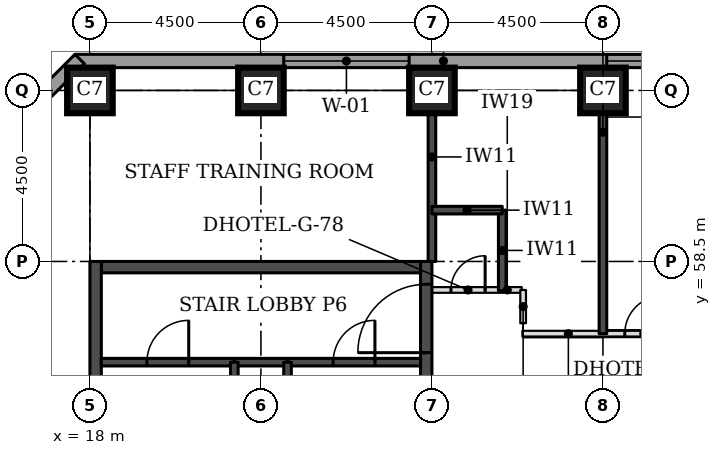
"""IFC4 building model, lengths in metres.
Left out: names, types, materials, properties, quantities, classifications, styles, units other than length and angle.
Written with IfcOpenShell. Run it as: python <this file> out.ifc"""

import sys

from ifc_helpers import new_model, si_unit, direction, frame, frame_2d, origin, origin_2d, place, context, subcontext, project, spatial, rectangle, extrude, element, fill, save


model = new_model("IFC4")
c1 = context("Model", 3, precision=1e-05, world=origin(), true_north=direction((0.0, 1.0)))
c2 = subcontext(c1, "Body", "Model", "MODEL_VIEW")
j1 = project(units=[si_unit("LENGTHUNIT", "METRE"), si_unit("PLANEANGLEUNIT", "RADIAN")], contexts=[c1])
p1 = place(None, origin())
s1 = spatial("IfcSite", under=j1, at=p1, CompositionType="ELEMENT")
p2 = place(p1, origin())
s2 = spatial("IfcBuilding", under=s1, at=p2, CompositionType="ELEMENT")
p3 = place(p2, frame((0.0, 0.0, 66.0)))
s3 = spatial("IfcBuildingStorey", under=s2, at=p3, CompositionType="ELEMENT", Elevation=66.0)
for number, where, z_axis, x_axis in (
    (1, (18.0, 63.0, 0.0), (0.0, 0.0, 1.0), (1.0, 0.0, 0.0)),
    (2, (22.5, 63.0, 0.0), (0.0, 0.0, 1.0), (1.0, 0.0, 0.0)),
    (3, (27.0, 63.0, 0.0), (0.0, 0.0, 1.0), (1.0, 0.0, 0.0)),
    (4, (31.5, 63.0, 0.0), (0.0, 0.0, 1.0), (1.0, 0.0, 0.0)),
):
    element("IfcColumn", number, at=place(p3, frame(where, z_axis=z_axis, x_axis=x_axis)), inside=s3, PredefinedType="COLUMN", context=c2, shape_type="SweptSolid", body=[
        extrude(rectangle(XDim=1.2, YDim=1.2, at=origin_2d()), origin(), (0.0, 0.0, 1.0), 3.3),
    ])
p4 = place(p3, frame((18.3, 58.35, 0.0), z_axis=(0.0, 0.0, 1.0), x_axis=(1.0, 0.0, 0.0)))
e5 = element("IfcWall", 5, at=p4, inside=s3, PredefinedType="SHEAR", context=c2, shape_type="SweptSolid", body=[
    extrude(rectangle(XDim=8.4, YDim=0.3, at=frame_2d((4.2, 0.0))), origin(), (0.0, 0.0, 1.0), 3.3),
])
p5 = place(p3, frame((18.15, 49.5, 0.0), z_axis=(0.0, 0.0, 1.0), x_axis=(0.0, 1.0, 0.0)))
e6 = element("IfcWall", 6, at=p5, inside=s3, PredefinedType="SHEAR", context=c2, shape_type="SweptSolid", body=[
    extrude(rectangle(XDim=9.0, YDim=0.3, at=frame_2d((4.5, 0.0))), origin(), (0.0, 0.0, 1.0), 3.3),
])
p6 = place(p3, frame((26.85, 49.5, 0.0), z_axis=(0.0, 0.0, 1.0), x_axis=(0.0, 1.0, 0.0)))
e7 = element("IfcWall", 7, at=p6, inside=s3, PredefinedType="SHEAR", context=c2, shape_type="SweptSolid", body=[
    extrude(rectangle(XDim=9.0, YDim=0.3, at=frame_2d((4.5, 0.0))), origin(), (0.0, 0.0, 1.0), 3.3),
])
p7 = place(p6, frame((6.6, 0.0, 0.0)))
e8 = element("IfcOpeningElement", 8, at=p7, cuts=e7, PredefinedType="OPENING", context=c2, shape_type="SweptSolid", body=[
    extrude(rectangle(XDim=1.8, YDim=2.1, at=frame_2d((0.9, 1.05))), frame((0.0, 0.16, 0.0), z_axis=(0.0, -1.0, 0.0), x_axis=(1.0, 0.0, 0.0)), (0.0, 0.0, 1.0), 0.32),
])
p8 = place(p3, frame((35.4, 63.775, 0.0), z_axis=(0.0, 0.0, 1.0), x_axis=(-1.0, 0.0, 0.0)))
e9 = element("IfcWall", 9, at=p8, inside=s3, PredefinedType="STANDARD", context=c2, shape_type="SweptSolid", body=[
    extrude(rectangle(XDim=17.793, YDim=0.35, at=frame_2d((8.897, 0.0))), origin(), (0.0, 0.0, 1.0), 3.055),
])
p9 = place(p8, frame((0.5, 0.0, 0.8)))
e10 = element("IfcOpeningElement", 10, at=p9, cuts=e9, PredefinedType="OPENING", context=c2, shape_type="SweptSolid", body=[
    extrude(rectangle(XDim=3.3, YDim=1.5, at=frame_2d((1.65, 0.75))), frame((0.0, 0.185, 0.0), z_axis=(0.0, -1.0, 0.0), x_axis=(1.0, 0.0, 0.0)), (0.0, 0.0, 1.0), 0.37),
])
p10 = place(p8, frame((9.0, 0.0, 0.8)))
e11 = element("IfcOpeningElement", 11, at=p10, cuts=e9, PredefinedType="OPENING", context=c2, shape_type="SweptSolid", body=[
    extrude(rectangle(XDim=3.3, YDim=1.5, at=frame_2d((1.65, 0.75))), frame((0.0, 0.185, 0.0), z_axis=(0.0, -1.0, 0.0), x_axis=(1.0, 0.0, 0.0)), (0.0, 0.0, 1.0), 0.37),
])
p11 = place(p3, frame((17.73, 63.826, 0.0), z_axis=(0.0, 0.0, 1.0), x_axis=(-0.707106781187, -0.707106781187, 0.0)))
e12 = element("IfcWall", 12, at=p11, inside=s3, PredefinedType="STANDARD", context=c2, shape_type="SweptSolid", body=[
    extrude(rectangle(XDim=7.151, YDim=0.35, at=frame_2d((3.576, 0.0))), origin(), (0.0, 0.0, 1.0), 3.055),
])
p12 = place(p11, frame((1.926, 0.0, 0.8)))
e13 = element("IfcOpeningElement", 13, at=p12, cuts=e12, PredefinedType="OPENING", context=c2, shape_type="SweptSolid", body=[
    extrude(rectangle(XDim=3.3, YDim=1.5, at=frame_2d((1.65, 0.75))), frame((0.0, 0.185, 0.0), z_axis=(0.0, -1.0, 0.0), x_axis=(1.0, 0.0, 0.0)), (0.0, 0.0, 1.0), 0.37),
])
p13 = place(p3, frame((29.38, 56.6, 0.0), z_axis=(0.0, 0.0, 1.0), x_axis=(1.0, 0.0, 0.0)))
e14 = element("IfcWall", 14, at=p13, inside=s3, PredefinedType="PARTITIONING", context=c2, shape_type="SweptSolid", body=[
    extrude(rectangle(XDim=13.62, YDim=0.15, at=frame_2d((6.81, 0.0))), origin(), (0.0, 0.0, 1.0), 3.08),
])
p14 = place(p13, frame((2.695, 0.0, 0.0)))
e15 = element("IfcOpeningElement", 15, at=p14, cuts=e14, PredefinedType="OPENING", context=c2, shape_type="SweptSolid", body=[
    extrude(rectangle(XDim=1.0, YDim=2.1, at=frame_2d((0.5, 1.05))), frame((0.0, 0.085, 0.0), z_axis=(0.0, -1.0, 0.0), x_axis=(1.0, 0.0, 0.0)), (0.0, 0.0, 1.0), 0.17),
])
p15 = place(p13, frame((9.67, 0.0, 0.0)))
e16 = element("IfcOpeningElement", 16, at=p15, cuts=e14, PredefinedType="OPENING", context=c2, shape_type="SweptSolid", body=[
    extrude(rectangle(XDim=0.9, YDim=2.1, at=frame_2d((0.45, 1.05))), frame((0.0, 0.085, 0.0), z_axis=(0.0, -1.0, 0.0), x_axis=(1.0, 0.0, 0.0)), (0.0, 0.0, 1.0), 0.17),
])
p16 = place(p3, frame((27.0, 58.5, 0.0), z_axis=(0.0, 0.0, 1.0), x_axis=(0.0, 1.0, 0.0)))
e17 = element("IfcWall", 17, at=p16, inside=s3, PredefinedType="SOLIDWALL", context=c2, shape_type="SweptSolid", body=[
    extrude(rectangle(XDim=3.9, YDim=0.2, at=frame_2d((1.95, 0.0))), origin(), (0.0, 0.0, 1.0), 3.08),
])
p17 = place(p3, frame((28.85, 57.73, 0.0), z_axis=(0.0, 0.0, 1.0), x_axis=(0.0, 1.0, 0.0)))
e18 = element("IfcWall", 18, at=p17, inside=s3, PredefinedType="SOLIDWALL", context=c2, shape_type="SweptSolid", body=[
    extrude(rectangle(XDim=2.12, YDim=0.2, at=frame_2d((1.06, 0.0))), origin(), (0.0, 0.0, 1.0), 3.08),
])
p18 = place(p3, frame((31.5, 56.6, 0.0), z_axis=(0.0, 0.0, 1.0), x_axis=(0.0, 1.0, 0.0)))
e19 = element("IfcWall", 19, at=p18, inside=s3, PredefinedType="SOLIDWALL", context=c2, shape_type="SweptSolid", body=[
    extrude(rectangle(XDim=5.8, YDim=0.2, at=frame_2d((2.9, 0.0))), origin(), (0.0, 0.0, 1.0), 3.08),
])
p19 = place(p3, frame((27.0, 59.85, 0.0), z_axis=(0.0, 0.0, 1.0), x_axis=(1.0, 0.0, 0.0)))
e20 = element("IfcWall", 20, at=p19, inside=s3, PredefinedType="SOLIDWALL", context=c2, shape_type="SweptSolid", body=[
    extrude(rectangle(XDim=1.85, YDim=0.2, at=frame_2d((0.925, 0.0))), origin(), (0.0, 0.0, 1.0), 3.08),
])
p20 = place(p3, frame((27.0, 57.75, 0.0), z_axis=(0.0, 0.0, 1.0), x_axis=(1.0, 0.0, 0.0)))
e21 = element("IfcWall", 21, at=p20, inside=s3, PredefinedType="PARTITIONING", context=c2, shape_type="SweptSolid", body=[
    extrude(rectangle(XDim=2.365, YDim=0.15, at=frame_2d((1.183, 0.0))), origin(), (0.0, 0.0, 1.0), 3.08),
])
p21 = place(p20, frame((0.5, 0.0, 0.0)))
e22 = element("IfcOpeningElement", 22, at=p21, cuts=e21, PredefinedType="OPENING", context=c2, shape_type="SweptSolid", body=[
    extrude(rectangle(XDim=0.9, YDim=2.1, at=frame_2d((0.45, 1.05))), frame((0.0, 0.085, 0.0), z_axis=(0.0, -1.0, 0.0), x_axis=(1.0, 0.0, 0.0)), (0.0, 0.0, 1.0), 0.17),
])
p22 = place(p3, frame((29.4, 57.75, 0.0), z_axis=(0.0, 0.0, 1.0), x_axis=(0.0, -1.0, 0.0)))
e23 = element("IfcWall", 23, at=p22, inside=s3, PredefinedType="PARTITIONING", context=c2, shape_type="SweptSolid", body=[
    extrude(rectangle(XDim=0.875, YDim=0.15, at=frame_2d((0.438, 0.0))), origin(), (0.0, 0.0, 1.0), 3.08),
])
p23 = place(p3, frame((21.8, 55.85, 0.0), z_axis=(0.0, 0.0, 1.0), x_axis=(1.0, 0.0, 0.0)))
e24 = element("IfcWall", 24, at=p23, inside=s3, PredefinedType="SOLIDWALL", context=c2, shape_type="SweptSolid", body=[
    extrude(rectangle(XDim=1.4, YDim=0.2, at=frame_2d((0.7, 0.0))), origin(), (0.0, 0.0, 1.0), 3.08),
])
p24 = place(p3, frame((18.3, 55.85, 0.0), z_axis=(0.0, 0.0, 1.0), x_axis=(1.0, 0.0, 0.0)))
e25 = element("IfcWall", 25, at=p24, inside=s3, PredefinedType="SOLIDWALL", context=c2, shape_type="SweptSolid", body=[
    extrude(rectangle(XDim=3.5, YDim=0.2, at=frame_2d((1.75, 0.0))), origin(), (0.0, 0.0, 1.0), 3.08),
])
p25 = place(p24, frame((1.2, 0.0, 0.0)))
e26 = element("IfcOpeningElement", 26, at=p25, cuts=e25, PredefinedType="OPENING", context=c2, shape_type="SweptSolid", body=[
    extrude(rectangle(XDim=1.1, YDim=2.1, at=frame_2d((0.55, 1.05))), frame((0.0, 0.11, 0.0), z_axis=(0.0, -1.0, 0.0), x_axis=(1.0, 0.0, 0.0)), (0.0, 0.0, 1.0), 0.22),
])
p26 = place(p3, frame((23.2, 55.85, 0.0), z_axis=(0.0, 0.0, 1.0), x_axis=(1.0, 0.0, 0.0)))
e27 = element("IfcWall", 27, at=p26, inside=s3, PredefinedType="SOLIDWALL", context=c2, shape_type="SweptSolid", body=[
    extrude(rectangle(XDim=3.5, YDim=0.2, at=frame_2d((1.75, 0.0))), origin(), (0.0, 0.0, 1.0), 3.08),
])
p27 = place(p26, frame((1.2, 0.0, 0.0)))
e28 = element("IfcOpeningElement", 28, at=p27, cuts=e27, PredefinedType="OPENING", context=c2, shape_type="SweptSolid", body=[
    extrude(rectangle(XDim=1.1, YDim=2.1, at=frame_2d((0.55, 1.05))), frame((0.0, 0.11, 0.0), z_axis=(0.0, -1.0, 0.0), x_axis=(1.0, 0.0, 0.0)), (0.0, 0.0, 1.0), 0.22),
])
for number, where, z_axis, x_axis in (
    (29, (21.8, 49.8, 0.0), (0.0, 0.0, 1.0), (0.0, 1.0, 0.0)),
    (30, (23.2, 49.8, 0.0), (0.0, 0.0, 1.0), (0.0, 1.0, 0.0)),
):
    element("IfcWall", number, at=place(p3, frame(where, z_axis=z_axis, x_axis=x_axis)), inside=s3, PredefinedType="SOLIDWALL", context=c2, shape_type="SweptSolid", body=[
        extrude(rectangle(XDim=6.05, YDim=0.2, at=frame_2d((3.025, 0.0))), origin(), (0.0, 0.0, 1.0), 3.08),
    ])
p28 = place(p9, origin())
e31 = element("IfcWindow", 31, at=p28, inside=s3, PartitioningType="SINGLE_PANEL", PredefinedType="WINDOW", context=c2, shape_type="SweptSolid", body=[
    extrude(rectangle(XDim=3.3, YDim=1.5, at=frame_2d((1.65, 0.75))), frame((0.0, 0.085, 0.0), z_axis=(0.0, -1.0, 0.0), x_axis=(1.0, 0.0, 0.0)), (0.0, 0.0, 1.0), 0.06),
])
fill(e10, e31)
p29 = place(p10, origin())
e32 = element("IfcWindow", 32, at=p29, inside=s3, PartitioningType="SINGLE_PANEL", PredefinedType="WINDOW", context=c2, shape_type="SweptSolid", body=[
    extrude(rectangle(XDim=3.3, YDim=1.5, at=frame_2d((1.65, 0.75))), frame((0.0, 0.085, 0.0), z_axis=(0.0, -1.0, 0.0), x_axis=(1.0, 0.0, 0.0)), (0.0, 0.0, 1.0), 0.06),
])
fill(e11, e32)
p30 = place(p14, origin())
e33 = element("IfcDoor", 33, at=p30, inside=s3, OperationType="SINGLE_SWING_RIGHT", PredefinedType="DOOR", context=c2, shape_type="SweptSolid", body=[
    extrude(rectangle(XDim=1.0, YDim=2.1, at=frame_2d((0.5, 1.05))), frame((0.0, 0.025, 0.0), z_axis=(0.0, -1.0, 0.0), x_axis=(1.0, 0.0, 0.0)), (0.0, 0.0, 1.0), 0.05),
])
fill(e15, e33)
p31 = place(p21, origin())
e34 = element("IfcDoor", 34, at=p31, inside=s3, OperationType="SINGLE_SWING_RIGHT", PredefinedType="DOOR", context=c2, shape_type="SweptSolid", body=[
    extrude(rectangle(XDim=0.9, YDim=2.1, at=frame_2d((0.45, 1.05))), frame((0.0, 0.025, 0.0), z_axis=(0.0, -1.0, 0.0), x_axis=(1.0, 0.0, 0.0)), (0.0, 0.0, 1.0), 0.05),
])
fill(e22, e34)
p32 = place(p25, origin())
e35 = element("IfcDoor", 35, at=p32, inside=s3, OperationType="SINGLE_SWING_RIGHT", PredefinedType="DOOR", context=c2, shape_type="SweptSolid", body=[
    extrude(rectangle(XDim=1.1, YDim=2.1, at=frame_2d((0.55, 1.05))), frame((0.0, 0.025, 0.0), z_axis=(0.0, -1.0, 0.0), x_axis=(1.0, 0.0, 0.0)), (0.0, 0.0, 1.0), 0.05),
])
fill(e26, e35)
p33 = place(p27, origin())
e36 = element("IfcDoor", 36, at=p33, inside=s3, OperationType="SINGLE_SWING_RIGHT", PredefinedType="DOOR", context=c2, shape_type="SweptSolid", body=[
    extrude(rectangle(XDim=1.1, YDim=2.1, at=frame_2d((0.55, 1.05))), frame((0.0, 0.025, 0.0), z_axis=(0.0, -1.0, 0.0), x_axis=(1.0, 0.0, 0.0)), (0.0, 0.0, 1.0), 0.05),
])
fill(e28, e36)
p34 = place(p7, origin())
e37 = element("IfcDoor", 37, at=p34, inside=s3, OperationType="SINGLE_SWING_LEFT", PredefinedType="DOOR", context=c2, shape_type="SweptSolid", body=[
    extrude(rectangle(XDim=1.8, YDim=2.1, at=frame_2d((0.9, 1.05))), frame((0.0, 0.025, 0.0), z_axis=(0.0, -1.0, 0.0), x_axis=(1.0, 0.0, 0.0)), (0.0, 0.0, 1.0), 0.05),
])
fill(e8, e37)
save(model, sys.argv[1])
